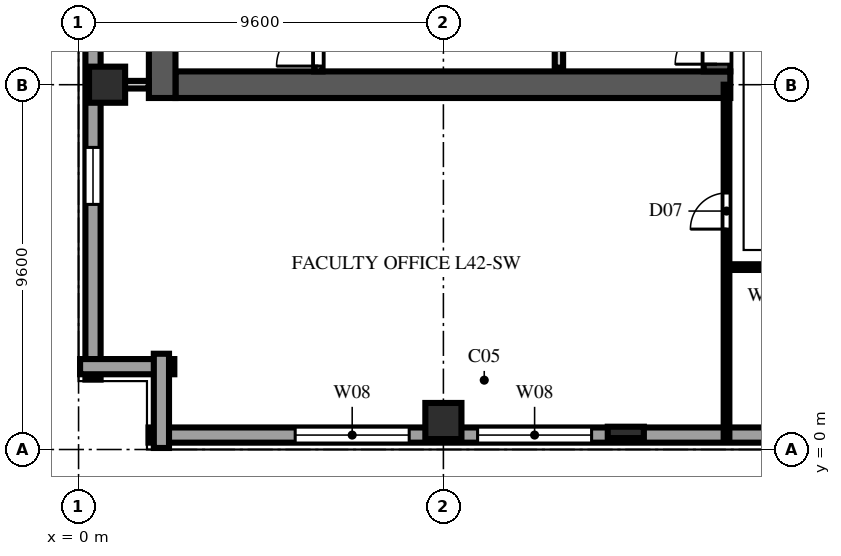
"""IFC4 building model, lengths in metres.
Left out: names, types, materials, properties, quantities, classifications, styles, units other than length and angle.
Written with IfcOpenShell. Run it as: python <this file> out.ifc"""

import sys

from ifc_helpers import new_model, si_unit, direction, frame, frame_2d, origin, origin_2d, place, context, subcontext, project, spatial, rectangle, extrude, element, fill, save


model = new_model("IFC4")
c1 = context("Model", 3, precision=1e-05, world=origin(), true_north=direction((0.0, 1.0)))
c2 = subcontext(c1, "Body", "Model", "MODEL_VIEW")
j1 = project(units=[si_unit("LENGTHUNIT", "METRE"), si_unit("PLANEANGLEUNIT", "RADIAN")], contexts=[c1])
p1 = place(None, origin())
s1 = spatial("IfcSite", under=j1, at=p1, CompositionType="ELEMENT")
p2 = place(p1, origin())
s2 = spatial("IfcBuilding", under=s1, at=p2, CompositionType="ELEMENT")
p3 = place(p2, frame((0.0, 0.0, 167.4)))
s3 = spatial("IfcBuildingStorey", under=s2, at=p3, CompositionType="ELEMENT", Elevation=167.4)
p4 = place(p3, frame((2.55, 9.6, 0.0), z_axis=(0.0, 0.0, 1.0), x_axis=(1.0, 0.0, 0.0)))
e1 = element("IfcWall", 1, at=p4, inside=s3, PredefinedType="SHEAR", context=c2, shape_type="SweptSolid", body=[
    extrude(rectangle(XDim=14.6, YDim=0.7, at=frame_2d((7.3, 0.0))), origin(), (0.0, 0.0, 1.0), 3.54),
])
p5 = place(p3, frame((2.2, 9.25, 0.0), z_axis=(0.0, 0.0, 1.0), x_axis=(0.0, 1.0, 0.0)))
e2 = element("IfcWall", 2, at=p5, inside=s3, PredefinedType="SHEAR", context=c2, shape_type="SweptSolid", body=[
    extrude(rectangle(XDim=39.1, YDim=0.7, at=frame_2d((19.55, 0.0))), origin(), (0.0, 0.0, 1.0), 3.54),
])
p6 = place(p3, frame((16.8, 9.95, 0.0), z_axis=(0.0, 0.0, 1.0), x_axis=(0.0, 1.0, 0.0)))
e3 = element("IfcWall", 3, at=p6, inside=s3, PredefinedType="SHEAR", context=c2, shape_type="SweptSolid", body=[
    extrude(rectangle(XDim=12.45, YDim=0.7, at=frame_2d((6.225, 0.0))), origin(), (0.0, 0.0, 1.0), 3.54),
])
p7 = place(p6, frame((0.19, 0.0, 0.0)))
e4 = element("IfcOpeningElement", 4, at=p7, cuts=e3, PredefinedType="OPENING", context=c2, shape_type="SweptSolid", body=[
    extrude(rectangle(XDim=1.1, YDim=2.2, at=frame_2d((0.55, 1.1))), frame((0.0, 0.362, 0.0), z_axis=(0.0, -1.0, 0.0), x_axis=(1.0, 0.0, 0.0)), (0.0, 0.0, 1.0), 0.724),
])
for number, where, z_axis, x_axis in (
    (5, (0.75, 9.6, 0.0), (0.0, 0.0, 1.0), (1.0, 0.0, 0.0)),
    (6, (9.6, 0.75, 0.0), (0.0, 0.0, 1.0), (1.0, 0.0, 0.0)),
):
    element("IfcColumn", number, at=place(p3, frame(where, z_axis=z_axis, x_axis=x_axis)), inside=s3, PredefinedType="COLUMN", context=c2, shape_type="SweptSolid", body=[
        extrude(rectangle(XDim=0.95, YDim=0.95, at=origin_2d()), origin(), (0.0, 0.0, 1.0), 3.8),
    ])
p8 = place(p3, frame((14.4, 0.45, 0.0), z_axis=(0.0, 0.0, 1.0), x_axis=(1.0, 0.0, 0.0)))
e7 = element("IfcColumn", 7, at=p8, inside=s3, PredefinedType="PILASTER", context=c2, shape_type="SweptSolid", body=[
    extrude(rectangle(XDim=0.95, YDim=0.3, at=origin_2d()), origin(), (0.0, 0.0, 1.0), 3.8),
])
p9 = place(p3, frame((1.84, 0.38, 0.0), z_axis=(0.0, 0.0, 1.0), x_axis=(1.0, 0.0, 0.0)))
e8 = element("IfcWall", 8, at=p9, inside=s3, PredefinedType="SOLIDWALL", context=c2, shape_type="SweptSolid", body=[
    extrude(rectangle(XDim=53.92, YDim=0.4, at=frame_2d((26.96, 0.0))), origin(), (0.0, 0.0, 1.0), 3.54),
])
p10 = place(p9, frame((3.86, 0.0, 0.75)))
e9 = element("IfcOpeningElement", 9, at=p10, cuts=e8, PredefinedType="OPENING", context=c2, shape_type="SweptSolid", body=[
    extrude(rectangle(XDim=3.0, YDim=1.9, at=frame_2d((1.5, 0.95))), frame((0.0, 0.212, 0.0), z_axis=(0.0, -1.0, 0.0), x_axis=(1.0, 0.0, 0.0)), (0.0, 0.0, 1.0), 0.424),
])
p11 = place(p9, frame((8.66, 0.0, 0.75)))
e10 = element("IfcOpeningElement", 10, at=p11, cuts=e8, PredefinedType="OPENING", context=c2, shape_type="SweptSolid", body=[
    extrude(rectangle(XDim=3.0, YDim=1.9, at=frame_2d((1.5, 0.95))), frame((0.0, 0.212, 0.0), z_axis=(0.0, -1.0, 0.0), x_axis=(1.0, 0.0, 0.0)), (0.0, 0.0, 1.0), 0.424),
])
p12 = place(p9, frame((18.26, 0.0, 0.75)))
e11 = element("IfcOpeningElement", 11, at=p12, cuts=e8, PredefinedType="OPENING", context=c2, shape_type="SweptSolid", body=[
    extrude(rectangle(XDim=3.0, YDim=1.9, at=frame_2d((1.5, 0.95))), frame((0.0, 0.212, 0.0), z_axis=(0.0, -1.0, 0.0), x_axis=(1.0, 0.0, 0.0)), (0.0, 0.0, 1.0), 0.424),
])
p13 = place(p3, frame((0.38, 65.36, 0.0), z_axis=(0.0, 0.0, 1.0), x_axis=(0.0, -1.0, 0.0)))
e12 = element("IfcWall", 12, at=p13, inside=s3, PredefinedType="SOLIDWALL", context=c2, shape_type="SweptSolid", body=[
    extrude(rectangle(XDim=63.52, YDim=0.4, at=frame_2d((31.76, 0.0))), origin(), (0.0, 0.0, 1.0), 3.54),
])
p14 = place(p13, frame((4.885, 0.0, 0.9)))
e13 = element("IfcOpeningElement", 13, at=p14, cuts=e12, PredefinedType="OPENING", context=c2, shape_type="SweptSolid", body=[
    extrude(rectangle(XDim=0.95, YDim=1.85, at=frame_2d((0.475, 0.925))), frame((0.0, 0.212, 0.0), z_axis=(0.0, -1.0, 0.0), x_axis=(1.0, 0.0, 0.0)), (0.0, 0.0, 1.0), 0.424),
])
p15 = place(p13, frame((9.41, 0.0, 0.9)))
e14 = element("IfcOpeningElement", 14, at=p15, cuts=e12, PredefinedType="OPENING", context=c2, shape_type="SweptSolid", body=[
    extrude(rectangle(XDim=1.5, YDim=1.85, at=frame_2d((0.75, 0.925))), frame((0.0, 0.212, 0.0), z_axis=(0.0, -1.0, 0.0), x_axis=(1.0, 0.0, 0.0)), (0.0, 0.0, 1.0), 0.424),
])
p16 = place(p13, frame((14.485, 0.0, 0.9)))
e15 = element("IfcOpeningElement", 15, at=p16, cuts=e12, PredefinedType="OPENING", context=c2, shape_type="SweptSolid", body=[
    extrude(rectangle(XDim=0.95, YDim=1.85, at=frame_2d((0.475, 0.925))), frame((0.0, 0.212, 0.0), z_axis=(0.0, -1.0, 0.0), x_axis=(1.0, 0.0, 0.0)), (0.0, 0.0, 1.0), 0.424),
])
p17 = place(p13, frame((19.01, 0.0, 0.9)))
e16 = element("IfcOpeningElement", 16, at=p17, cuts=e12, PredefinedType="OPENING", context=c2, shape_type="SweptSolid", body=[
    extrude(rectangle(XDim=1.5, YDim=1.85, at=frame_2d((0.75, 0.925))), frame((0.0, 0.212, 0.0), z_axis=(0.0, -1.0, 0.0), x_axis=(1.0, 0.0, 0.0)), (0.0, 0.0, 1.0), 0.424),
])
p18 = place(p13, frame((24.085, 0.0, 0.9)))
e17 = element("IfcOpeningElement", 17, at=p18, cuts=e12, PredefinedType="OPENING", context=c2, shape_type="SweptSolid", body=[
    extrude(rectangle(XDim=0.95, YDim=1.85, at=frame_2d((0.475, 0.925))), frame((0.0, 0.212, 0.0), z_axis=(0.0, -1.0, 0.0), x_axis=(1.0, 0.0, 0.0)), (0.0, 0.0, 1.0), 0.424),
])
p19 = place(p13, frame((28.61, 0.0, 0.9)))
e18 = element("IfcOpeningElement", 18, at=p19, cuts=e12, PredefinedType="OPENING", context=c2, shape_type="SweptSolid", body=[
    extrude(rectangle(XDim=1.5, YDim=1.85, at=frame_2d((0.75, 0.925))), frame((0.0, 0.212, 0.0), z_axis=(0.0, -1.0, 0.0), x_axis=(1.0, 0.0, 0.0)), (0.0, 0.0, 1.0), 0.424),
])
p20 = place(p13, frame((33.685, 0.0, 0.9)))
e19 = element("IfcOpeningElement", 19, at=p20, cuts=e12, PredefinedType="OPENING", context=c2, shape_type="SweptSolid", body=[
    extrude(rectangle(XDim=0.95, YDim=1.85, at=frame_2d((0.475, 0.925))), frame((0.0, 0.212, 0.0), z_axis=(0.0, -1.0, 0.0), x_axis=(1.0, 0.0, 0.0)), (0.0, 0.0, 1.0), 0.424),
])
p21 = place(p13, frame((38.21, 0.0, 0.9)))
e20 = element("IfcOpeningElement", 20, at=p21, cuts=e12, PredefinedType="OPENING", context=c2, shape_type="SweptSolid", body=[
    extrude(rectangle(XDim=1.5, YDim=1.85, at=frame_2d((0.75, 0.925))), frame((0.0, 0.212, 0.0), z_axis=(0.0, -1.0, 0.0), x_axis=(1.0, 0.0, 0.0)), (0.0, 0.0, 1.0), 0.424),
])
p22 = place(p13, frame((43.285, 0.0, 0.9)))
e21 = element("IfcOpeningElement", 21, at=p22, cuts=e12, PredefinedType="OPENING", context=c2, shape_type="SweptSolid", body=[
    extrude(rectangle(XDim=0.95, YDim=1.85, at=frame_2d((0.475, 0.925))), frame((0.0, 0.212, 0.0), z_axis=(0.0, -1.0, 0.0), x_axis=(1.0, 0.0, 0.0)), (0.0, 0.0, 1.0), 0.424),
])
p23 = place(p13, frame((47.81, 0.0, 0.9)))
e22 = element("IfcOpeningElement", 22, at=p23, cuts=e12, PredefinedType="OPENING", context=c2, shape_type="SweptSolid", body=[
    extrude(rectangle(XDim=1.5, YDim=1.85, at=frame_2d((0.75, 0.925))), frame((0.0, 0.212, 0.0), z_axis=(0.0, -1.0, 0.0), x_axis=(1.0, 0.0, 0.0)), (0.0, 0.0, 1.0), 0.424),
])
p24 = place(p13, frame((52.885, 0.0, 0.9)))
e23 = element("IfcOpeningElement", 23, at=p24, cuts=e12, PredefinedType="OPENING", context=c2, shape_type="SweptSolid", body=[
    extrude(rectangle(XDim=0.95, YDim=1.85, at=frame_2d((0.475, 0.925))), frame((0.0, 0.212, 0.0), z_axis=(0.0, -1.0, 0.0), x_axis=(1.0, 0.0, 0.0)), (0.0, 0.0, 1.0), 0.424),
])
p25 = place(p13, frame((57.41, 0.0, 0.9)))
e24 = element("IfcOpeningElement", 24, at=p25, cuts=e12, PredefinedType="OPENING", context=c2, shape_type="SweptSolid", body=[
    extrude(rectangle(XDim=1.5, YDim=1.85, at=frame_2d((0.75, 0.925))), frame((0.0, 0.212, 0.0), z_axis=(0.0, -1.0, 0.0), x_axis=(1.0, 0.0, 0.0)), (0.0, 0.0, 1.0), 0.424),
])
for number, where, z_axis, x_axis in (
    (25, (0.04, 2.18, 0.0), (0.0, 0.0, 1.0), (1.0, 0.0, 0.0)),
    (26, (2.18, 2.52, 0.0), (0.0, 0.0, 1.0), (0.0, -1.0, 0.0)),
):
    element("IfcWall", number, at=place(p3, frame(where, z_axis=z_axis, x_axis=x_axis)), inside=s3, PredefinedType="SOLIDWALL", context=c2, shape_type="SweptSolid", body=[
        extrude(rectangle(XDim=2.48, YDim=0.4, at=frame_2d((1.24, 0.0))), origin(), (0.0, 0.0, 1.0), 3.54),
    ])
p26 = place(p3, frame((6.31, 9.95, 0.0), z_axis=(0.0, 0.0, 1.0), x_axis=(0.0, 1.0, 0.0)))
e27 = element("IfcWall", 27, at=p26, inside=s3, PredefinedType="SOLIDWALL", context=c2, shape_type="SweptSolid", body=[
    extrude(rectangle(XDim=7.81, YDim=0.22, at=frame_2d((3.905, 0.0))), origin(), (0.0, 0.0, 1.0), 3.54),
])
p27 = place(p26, frame((0.14, 0.0, 0.0)))
e28 = element("IfcOpeningElement", 28, at=p27, cuts=e27, PredefinedType="OPENING", context=c2, shape_type="SweptSolid", body=[
    extrude(rectangle(XDim=1.1, YDim=2.2, at=frame_2d((0.55, 1.1))), frame((0.0, 0.122, 0.0), z_axis=(0.0, -1.0, 0.0), x_axis=(1.0, 0.0, 0.0)), (0.0, 0.0, 1.0), 0.244),
])
p28 = place(p3, frame((12.64, 10.05, 0.0), z_axis=(0.0, 0.0, 1.0), x_axis=(0.0, 1.0, 0.0)))
e29 = element("IfcWall", 29, at=p28, inside=s3, PredefinedType="SOLIDWALL", context=c2, shape_type="SweptSolid", body=[
    extrude(rectangle(XDim=7.71, YDim=0.22, at=frame_2d((3.855, 0.0))), origin(), (0.0, 0.0, 1.0), 3.54),
])
p29 = place(p3, frame((0.85, 9.6, 0.0), z_axis=(0.0, 0.0, 1.0), x_axis=(1.0, 0.0, 0.0)))
e30 = element("IfcWall", 30, at=p29, inside=s3, PredefinedType="SOLIDWALL", context=c2, shape_type="SweptSolid", body=[
    extrude(rectangle(XDim=0.995, YDim=0.2, at=frame_2d((0.498, 0.0))), origin(), (0.0, 0.0, 1.0), 2.845),
])
p30 = place(p3, frame((17.05, 4.8, 0.0), z_axis=(0.0, 0.0, 1.0), x_axis=(1.0, 0.0, 0.0)))
e31 = element("IfcWall", 31, at=p30, inside=s3, PredefinedType="PARTITIONING", context=c2, shape_type="SweptSolid", body=[
    extrude(rectangle(XDim=2.15, YDim=0.15, at=frame_2d((1.075, 0.0))), origin(), (0.0, 0.0, 1.0), 3.54),
])
p31 = place(p3, frame((17.05, 0.22, 0.0), z_axis=(0.0, 0.0, 1.0), x_axis=(0.0, 1.0, 0.0)))
e32 = element("IfcWall", 32, at=p31, inside=s3, PredefinedType="PARTITIONING", context=c2, shape_type="SweptSolid", body=[
    extrude(rectangle(XDim=9.38, YDim=0.15, at=frame_2d((4.69, 0.0))), origin(), (0.0, 0.0, 1.0), 3.54),
])
p32 = place(p31, frame((5.58, 0.0, 0.0)))
e33 = element("IfcOpeningElement", 33, at=p32, cuts=e32, PredefinedType="OPENING", context=c2, shape_type="SweptSolid", body=[
    extrude(rectangle(XDim=0.95, YDim=2.15, at=frame_2d((0.475, 1.075))), frame((0.0, 0.087, 0.0), z_axis=(0.0, -1.0, 0.0), x_axis=(1.0, 0.0, 0.0)), (0.0, 0.0, 1.0), 0.174),
])
p33 = place(p10, origin())
e34 = element("IfcWindow", 34, at=p33, inside=s3, PartitioningType="TRIPLE_PANEL_VERTICAL", PredefinedType="WINDOW", context=c2, shape_type="SweptSolid", body=[
    extrude(rectangle(XDim=3.0, YDim=1.9, at=frame_2d((1.5, 0.95))), frame((0.0, 0.11, 0.0), z_axis=(0.0, -1.0, 0.0), x_axis=(1.0, 0.0, 0.0)), (0.0, 0.0, 1.0), 0.06),
])
fill(e9, e34)
p34 = place(p11, origin())
e35 = element("IfcWindow", 35, at=p34, inside=s3, PartitioningType="TRIPLE_PANEL_VERTICAL", PredefinedType="WINDOW", context=c2, shape_type="SweptSolid", body=[
    extrude(rectangle(XDim=3.0, YDim=1.9, at=frame_2d((1.5, 0.95))), frame((0.0, 0.11, 0.0), z_axis=(0.0, -1.0, 0.0), x_axis=(1.0, 0.0, 0.0)), (0.0, 0.0, 1.0), 0.06),
])
fill(e10, e35)
p35 = place(p25, origin())
e36 = element("IfcWindow", 36, at=p35, inside=s3, PartitioningType="DOUBLE_PANEL_VERTICAL", PredefinedType="WINDOW", context=c2, shape_type="SweptSolid", body=[
    extrude(rectangle(XDim=1.5, YDim=1.85, at=frame_2d((0.75, 0.925))), frame((0.0, 0.11, 0.0), z_axis=(0.0, -1.0, 0.0), x_axis=(1.0, 0.0, 0.0)), (0.0, 0.0, 1.0), 0.06),
])
fill(e24, e36)
p36 = place(p27, origin())
e37 = element("IfcDoor", 37, at=p36, inside=s3, OperationType="SINGLE_SWING_LEFT", PredefinedType="DOOR", context=c2, shape_type="SweptSolid", body=[
    extrude(rectangle(XDim=1.1, YDim=2.2, at=frame_2d((0.55, 1.1))), frame((0.0, 0.025, 0.0), z_axis=(0.0, -1.0, 0.0), x_axis=(1.0, 0.0, 0.0)), (0.0, 0.0, 1.0), 0.05),
])
fill(e28, e37)
p37 = place(p7, origin())
e38 = element("IfcDoor", 38, at=p37, inside=s3, OperationType="SINGLE_SWING_LEFT", PredefinedType="DOOR", context=c2, shape_type="SweptSolid", body=[
    extrude(rectangle(XDim=1.1, YDim=2.2, at=frame_2d((0.55, 1.1))), frame((0.0, 0.025, 0.0), z_axis=(0.0, -1.0, 0.0), x_axis=(1.0, 0.0, 0.0)), (0.0, 0.0, 1.0), 0.05),
])
fill(e4, e38)
p38 = place(p32, origin())
e39 = element("IfcDoor", 39, at=p38, inside=s3, OperationType="SINGLE_SWING_LEFT", PredefinedType="DOOR", context=c2, shape_type="SweptSolid", body=[
    extrude(rectangle(XDim=0.95, YDim=2.15, at=frame_2d((0.475, 1.075))), frame((0.0, 0.025, 0.0), z_axis=(0.0, -1.0, 0.0), x_axis=(1.0, 0.0, 0.0)), (0.0, 0.0, 1.0), 0.05),
])
fill(e33, e39)
save(model, sys.argv[1])
